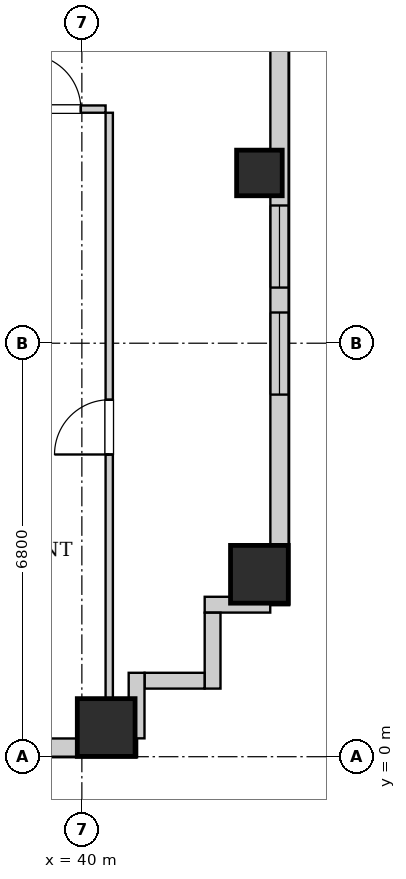
"""IFC4 building model, lengths in metres.
Left out: names, types, materials, properties, quantities, classifications, styles, units other than length and angle.
Written with IfcOpenShell. Run it as: python <this file> out.ifc"""

import sys

from ifc_helpers import new_model, si_unit, direction, frame, frame_2d, origin, origin_2d, place, context, subcontext, project, spatial, rectangle, extrude, element, fill, save


model = new_model("IFC4")
c1 = context("Model", 3, precision=1e-05, world=origin(), true_north=direction((0.0, 1.0)))
c2 = subcontext(c1, "Body", "Model", "MODEL_VIEW")
j1 = project(units=[si_unit("LENGTHUNIT", "METRE"), si_unit("PLANEANGLEUNIT", "RADIAN")], contexts=[c1])
p1 = place(None, origin())
s1 = spatial("IfcSite", under=j1, at=p1, CompositionType="ELEMENT")
p2 = place(p1, origin())
s2 = spatial("IfcBuilding", under=s1, at=p2, CompositionType="ELEMENT")
p3 = place(p2, frame((0.0, 0.0, 103.9)))
s3 = spatial("IfcBuildingStorey", under=s2, at=p3, CompositionType="ELEMENT", Elevation=103.9)
for number, where, z_axis, x_axis in (
    (1, (40.4, 0.48, 0.0), (0.0, 0.0, 1.0), (1.0, 0.0, 0.0)),
    (2, (42.92, 3.0, 0.0), (0.0, 0.0, 1.0), (1.0, 0.0, 0.0)),
):
    element("IfcColumn", number, at=place(p3, frame(where, z_axis=z_axis, x_axis=x_axis)), inside=s3, PredefinedType="COLUMN", context=c2, shape_type="SweptSolid", body=[
        extrude(rectangle(XDim=0.95, YDim=0.95, at=origin_2d()), origin(), (0.0, 0.0, 1.0), 3.2),
    ])
p4 = place(p3, frame((42.92, 9.6, 0.0), z_axis=(0.0, 0.0, 1.0), x_axis=(1.0, 0.0, 0.0)))
e3 = element("IfcColumn", 3, at=p4, inside=s3, PredefinedType="COLUMN", context=c2, shape_type="SweptSolid", body=[
    extrude(rectangle(XDim=0.75, YDim=0.75, at=origin_2d()), origin(), (0.0, 0.0, 1.0), 3.2),
])
p5 = place(p3, frame((43.25, 40.8, 0.0), z_axis=(0.0, 0.0, 1.0), x_axis=(0.0, -1.0, 0.0)))
e4 = element("IfcWall", 4, at=p5, inside=s3, PredefinedType="SOLIDWALL", context=c2, shape_type="SweptSolid", body=[
    extrude(rectangle(XDim=38.3, YDim=0.3, at=frame_2d((19.15, 0.0))), origin(), (0.0, 0.0, 1.0), 2.94),
])
p6 = place(p5, frame((33.495, 0.0, 0.55)))
e5 = element("IfcOpeningElement", 5, at=p6, cuts=e4, PredefinedType="OPENING", context=c2, shape_type="SweptSolid", body=[
    extrude(rectangle(XDim=1.35, YDim=1.2, at=frame_2d((0.675, 0.6))), frame((0.0, 0.16, 0.0), z_axis=(0.0, -1.0, 0.0), x_axis=(1.0, 0.0, 0.0)), (0.0, 0.0, 1.0), 0.32),
])
p7 = place(p5, frame((31.735, 0.0, 0.55)))
e6 = element("IfcOpeningElement", 6, at=p7, cuts=e4, PredefinedType="OPENING", context=c2, shape_type="SweptSolid", body=[
    extrude(rectangle(XDim=1.35, YDim=1.2, at=frame_2d((0.675, 0.6))), frame((0.0, 0.16, 0.0), z_axis=(0.0, -1.0, 0.0), x_axis=(1.0, 0.0, 0.0)), (0.0, 0.0, 1.0), 0.32),
])
p8 = place(p5, frame((21.93, 0.0, 0.55)))
e7 = element("IfcOpeningElement", 7, at=p8, cuts=e4, PredefinedType="OPENING", context=c2, shape_type="SweptSolid", body=[
    extrude(rectangle(XDim=1.35, YDim=1.2, at=frame_2d((0.675, 0.6))), frame((0.0, 0.16, 0.0), z_axis=(0.0, -1.0, 0.0), x_axis=(1.0, 0.0, 0.0)), (0.0, 0.0, 1.0), 0.32),
])
p9 = place(p5, frame((23.54, 0.0, 0.55)))
e8 = element("IfcOpeningElement", 8, at=p9, cuts=e4, PredefinedType="OPENING", context=c2, shape_type="SweptSolid", body=[
    extrude(rectangle(XDim=1.35, YDim=1.2, at=frame_2d((0.675, 0.6))), frame((0.0, 0.16, 0.0), z_axis=(0.0, -1.0, 0.0), x_axis=(1.0, 0.0, 0.0)), (0.0, 0.0, 1.0), 0.32),
])
p10 = place(p5, frame((14.95, 0.0, 0.55)))
e9 = element("IfcOpeningElement", 9, at=p10, cuts=e4, PredefinedType="OPENING", context=c2, shape_type="SweptSolid", body=[
    extrude(rectangle(XDim=1.35, YDim=1.2, at=frame_2d((0.675, 0.6))), frame((0.0, 0.16, 0.0), z_axis=(0.0, -1.0, 0.0), x_axis=(1.0, 0.0, 0.0)), (0.0, 0.0, 1.0), 0.32),
])
p11 = place(p5, frame((12.335, 0.0, 0.55)))
e10 = element("IfcOpeningElement", 10, at=p11, cuts=e4, PredefinedType="OPENING", context=c2, shape_type="SweptSolid", body=[
    extrude(rectangle(XDim=1.35, YDim=1.2, at=frame_2d((0.675, 0.6))), frame((0.0, 0.16, 0.0), z_axis=(0.0, -1.0, 0.0), x_axis=(1.0, 0.0, 0.0)), (0.0, 0.0, 1.0), 0.32),
])
p12 = place(p3, frame((40.9, 0.15, 0.0), z_axis=(0.0, 0.0, 1.0), x_axis=(-1.0, 0.0, 0.0)))
e11 = element("IfcWall", 11, at=p12, inside=s3, PredefinedType="SOLIDWALL", context=c2, shape_type="SweptSolid", body=[
    extrude(rectangle(XDim=23.15, YDim=0.3, at=frame_2d((11.575, 0.0))), origin(), (0.0, 0.0, 1.0), 2.94),
])
p13 = place(p12, frame((20.296, 0.0, 0.55)))
e12 = element("IfcOpeningElement", 12, at=p13, cuts=e11, PredefinedType="OPENING", context=c2, shape_type="SweptSolid", body=[
    extrude(rectangle(XDim=1.35, YDim=1.2, at=frame_2d((0.675, 0.6))), frame((0.0, 0.16, 0.0), z_axis=(0.0, -1.0, 0.0), x_axis=(1.0, 0.0, 0.0)), (0.0, 0.0, 1.0), 0.32),
])
p14 = place(p12, frame((12.55, 0.0, 0.55)))
e13 = element("IfcOpeningElement", 13, at=p14, cuts=e11, PredefinedType="OPENING", context=c2, shape_type="SweptSolid", body=[
    extrude(rectangle(XDim=0.85, YDim=1.2, at=frame_2d((0.425, 0.6))), frame((0.0, 0.16, 0.0), z_axis=(0.0, -1.0, 0.0), x_axis=(1.0, 0.0, 0.0)), (0.0, 0.0, 1.0), 0.32),
])
p15 = place(p12, frame((9.622, 0.0, 0.55)))
e14 = element("IfcOpeningElement", 14, at=p15, cuts=e11, PredefinedType="OPENING", context=c2, shape_type="SweptSolid", body=[
    extrude(rectangle(XDim=1.35, YDim=1.2, at=frame_2d((0.675, 0.6))), frame((0.0, 0.16, 0.0), z_axis=(0.0, -1.0, 0.0), x_axis=(1.0, 0.0, 0.0)), (0.0, 0.0, 1.0), 0.32),
])
p16 = place(p12, frame((5.815, 0.0, 0.55)))
e15 = element("IfcOpeningElement", 15, at=p16, cuts=e11, PredefinedType="OPENING", context=c2, shape_type="SweptSolid", body=[
    extrude(rectangle(XDim=1.35, YDim=1.2, at=frame_2d((0.675, 0.6))), frame((0.0, 0.16, 0.0), z_axis=(0.0, -1.0, 0.0), x_axis=(1.0, 0.0, 0.0)), (0.0, 0.0, 1.0), 0.32),
])
p17 = place(p12, frame((2.106, 0.0, 0.55)))
e16 = element("IfcOpeningElement", 16, at=p17, cuts=e11, PredefinedType="OPENING", context=c2, shape_type="SweptSolid", body=[
    extrude(rectangle(XDim=1.35, YDim=1.2, at=frame_2d((0.675, 0.6))), frame((0.0, 0.16, 0.0), z_axis=(0.0, -1.0, 0.0), x_axis=(1.0, 0.0, 0.0)), (0.0, 0.0, 1.0), 0.32),
])
p18 = place(p3, frame((43.098, 2.5, 0.0), z_axis=(0.0, 0.0, 1.0), x_axis=(-1.0, 0.0, 0.0)))
e17 = element("IfcWall", 17, at=p18, inside=s3, PredefinedType="SOLIDWALL", context=c2, shape_type="SweptSolid", body=[
    extrude(rectangle(XDim=1.078, YDim=0.26, at=frame_2d((0.539, 0.0))), origin(), (0.0, 0.0, 1.0), 2.94),
])
p19 = place(p3, frame((42.15, 2.368, 0.0), z_axis=(0.0, 0.0, 1.0), x_axis=(0.0, -1.0, 0.0)))
e18 = element("IfcWall", 18, at=p19, inside=s3, PredefinedType="SOLIDWALL", context=c2, shape_type="SweptSolid", body=[
    extrude(rectangle(XDim=1.248, YDim=0.26, at=frame_2d((0.624, 0.0))), origin(), (0.0, 0.0, 1.0), 2.94),
])
p20 = place(p3, frame((42.018, 1.25, 0.0), z_axis=(0.0, 0.0, 1.0), x_axis=(-1.0, 0.0, 0.0)))
e19 = element("IfcWall", 19, at=p20, inside=s3, PredefinedType="SOLIDWALL", context=c2, shape_type="SweptSolid", body=[
    extrude(rectangle(XDim=0.986, YDim=0.26, at=frame_2d((0.493, 0.0))), origin(), (0.0, 0.0, 1.0), 2.94),
])
p21 = place(p3, frame((40.9, 1.38, 0.0), z_axis=(0.0, 0.0, 1.0), x_axis=(0.0, -1.0, 0.0)))
e20 = element("IfcWall", 20, at=p21, inside=s3, PredefinedType="SOLIDWALL", context=c2, shape_type="SweptSolid", body=[
    extrude(rectangle(XDim=1.078, YDim=0.26, at=frame_2d((0.539, 0.0))), origin(), (0.0, 0.0, 1.0), 2.94),
])
p22 = place(p3, frame((38.676, 10.65, 0.0), z_axis=(0.0, 0.0, 1.0), x_axis=(1.0, 0.0, 0.0)))
e21 = element("IfcWall", 21, at=p22, inside=s3, PredefinedType="PARTITIONING", context=c2, shape_type="SweptSolid", body=[
    extrude(rectangle(XDim=1.714, YDim=0.12, at=frame_2d((0.857, 0.0))), origin(), (0.0, 0.0, 1.0), 2.94),
])
p23 = place(p22, frame((0.407, 0.0, 0.0)))
e22 = element("IfcOpeningElement", 22, at=p23, cuts=e21, PredefinedType="OPENING", context=c2, shape_type="SweptSolid", body=[
    extrude(rectangle(XDim=0.9, YDim=2.05, at=frame_2d((0.45, 1.025))), frame((0.0, 0.07, 0.0), z_axis=(0.0, -1.0, 0.0), x_axis=(1.0, 0.0, 0.0)), (0.0, 0.0, 1.0), 0.14),
])
p24 = place(p3, frame((40.45, 0.28, 0.0), z_axis=(0.0, 0.0, 1.0), x_axis=(0.0, 1.0, 0.0)))
e23 = element("IfcWall", 23, at=p24, inside=s3, PredefinedType="PARTITIONING", context=c2, shape_type="SweptSolid", body=[
    extrude(rectangle(XDim=10.31, YDim=0.12, at=frame_2d((5.155, 0.0))), origin(), (0.0, 0.0, 1.0), 2.94),
])
p25 = place(p24, frame((4.69, 0.0, 0.0)))
e24 = element("IfcOpeningElement", 24, at=p25, cuts=e23, PredefinedType="OPENING", context=c2, shape_type="SweptSolid", body=[
    extrude(rectangle(XDim=0.9, YDim=2.05, at=frame_2d((0.45, 1.025))), frame((0.0, 0.07, 0.0), z_axis=(0.0, -1.0, 0.0), x_axis=(1.0, 0.0, 0.0)), (0.0, 0.0, 1.0), 0.14),
])
p26 = place(p23, origin())
e25 = element("IfcDoor", 25, at=p26, inside=s3, OperationType="SINGLE_SWING_LEFT", PredefinedType="DOOR", context=c2, shape_type="SweptSolid", body=[
    extrude(rectangle(XDim=0.9, YDim=2.05, at=frame_2d((0.45, 1.025))), frame((0.0, 0.025, 0.0), z_axis=(0.0, -1.0, 0.0), x_axis=(1.0, 0.0, 0.0)), (0.0, 0.0, 1.0), 0.05),
])
fill(e22, e25)
p27 = place(p25, origin())
e26 = element("IfcDoor", 26, at=p27, inside=s3, OperationType="SINGLE_SWING_LEFT", PredefinedType="DOOR", context=c2, shape_type="SweptSolid", body=[
    extrude(rectangle(XDim=0.9, YDim=2.05, at=frame_2d((0.45, 1.025))), frame((0.0, 0.025, 0.0), z_axis=(0.0, -1.0, 0.0), x_axis=(1.0, 0.0, 0.0)), (0.0, 0.0, 1.0), 0.05),
])
fill(e24, e26)
p28 = place(p6, origin())
e27 = element("IfcWindow", 27, at=p28, inside=s3, PartitioningType="SINGLE_PANEL", PredefinedType="WINDOW", context=c2, shape_type="SweptSolid", body=[
    extrude(rectangle(XDim=1.35, YDim=1.2, at=frame_2d((0.675, 0.6))), frame((0.0, 0.03, 0.0), z_axis=(0.0, -1.0, 0.0), x_axis=(1.0, 0.0, 0.0)), (0.0, 0.0, 1.0), 0.06),
])
fill(e5, e27)
p29 = place(p7, origin())
e28 = element("IfcWindow", 28, at=p29, inside=s3, PartitioningType="SINGLE_PANEL", PredefinedType="WINDOW", context=c2, shape_type="SweptSolid", body=[
    extrude(rectangle(XDim=1.35, YDim=1.2, at=frame_2d((0.675, 0.6))), frame((0.0, 0.03, 0.0), z_axis=(0.0, -1.0, 0.0), x_axis=(1.0, 0.0, 0.0)), (0.0, 0.0, 1.0), 0.06),
])
fill(e6, e28)
save(model, sys.argv[1])
